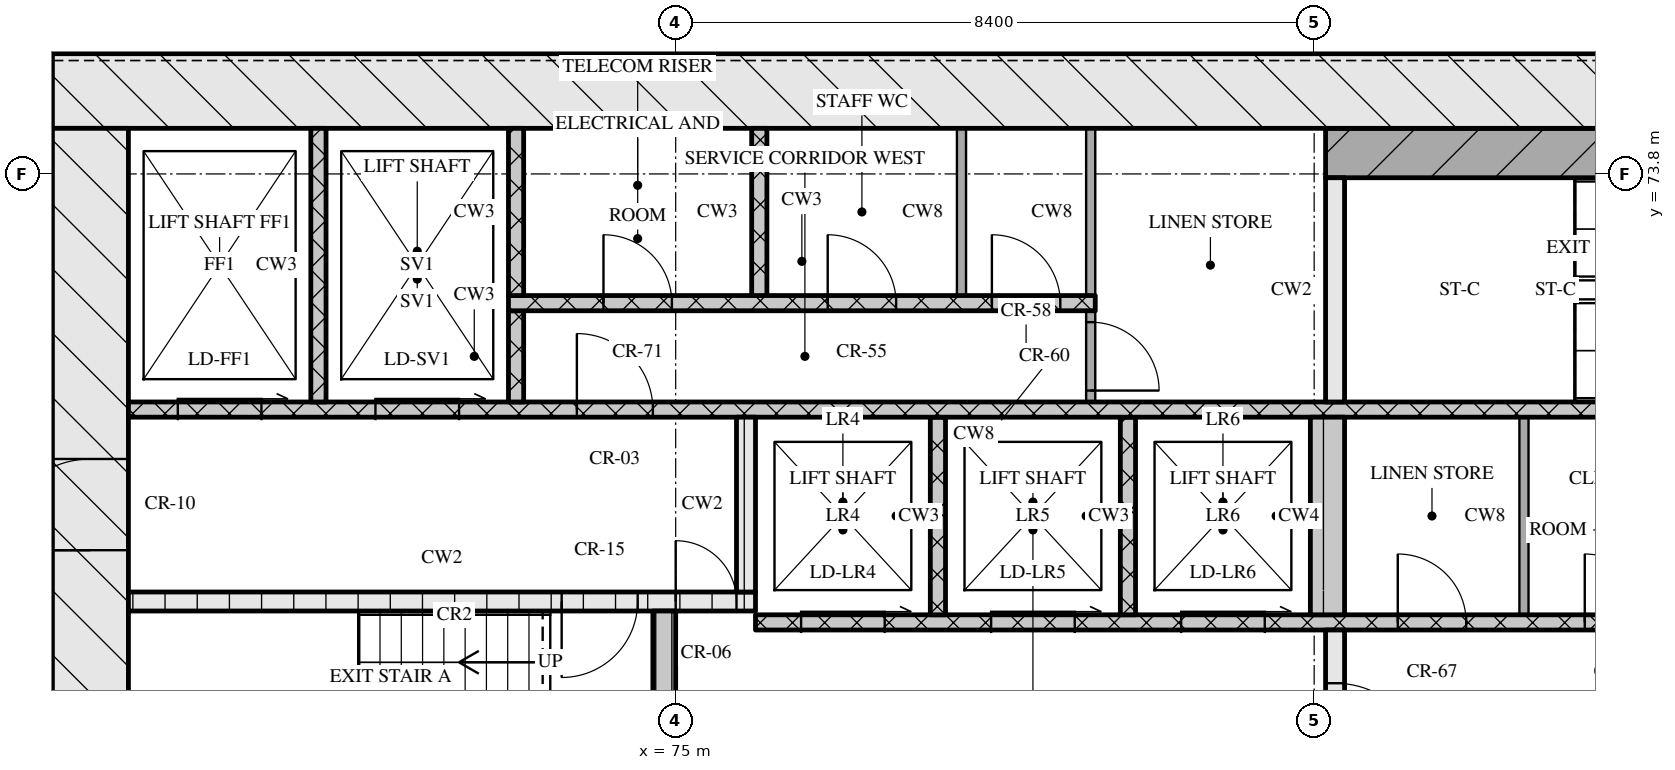
"""IFC4 building model, lengths in metres.
Left out: names, types, materials, properties, quantities, classifications, styles, units other than length and angle.
Written with IfcOpenShell. Run it as: python <this file> out.ifc"""

import sys

from ifc_helpers import new_model, si_unit, direction, frame, frame_2d, origin, place, context, subcontext, project, spatial, rectangle, extrude, element, fill, save


model = new_model("IFC4")
c1 = context("Model", 3, precision=1e-05, world=origin(), true_north=direction((0.0, 1.0)))
c2 = subcontext(c1, "Body", "Model", "MODEL_VIEW")
j1 = project(units=[si_unit("LENGTHUNIT", "METRE"), si_unit("PLANEANGLEUNIT", "RADIAN")], contexts=[c1])
p1 = place(None, origin())
s1 = spatial("IfcSite", under=j1, at=p1, CompositionType="ELEMENT")
p2 = place(p1, origin())
s2 = spatial("IfcBuilding", under=s1, at=p2, CompositionType="ELEMENT")
p3 = place(p2, frame((0.0, 0.0, 116.85)))
s3 = spatial("IfcBuildingStorey", under=s2, at=p3, CompositionType="ELEMENT", Elevation=116.85)
p4 = place(p3, frame((66.8, 74.9, 0.0), z_axis=(0.0, 0.0, 1.0), x_axis=(1.0, 0.0, 0.0)))
e1 = element("IfcWall", 1, at=p4, inside=s3, PredefinedType="SOLIDWALL", context=c2, shape_type="SweptSolid", body=[
    extrude(rectangle(XDim=41.6, YDim=1.0, at=frame_2d((20.8, 0.0))), origin(), (0.0, 0.0, 1.0), 3.32),
])
p5 = place(p3, frame((67.3, 62.4, 0.0), z_axis=(0.0, 0.0, 1.0), x_axis=(0.0, 1.0, 0.0)))
e2 = element("IfcWall", 2, at=p5, inside=s3, PredefinedType="SOLIDWALL", context=c2, shape_type="SweptSolid", body=[
    extrude(rectangle(XDim=12.0, YDim=1.0, at=frame_2d((6.0, 0.0))), origin(), (0.0, 0.0, 1.0), 3.32),
])
p6 = place(p5, frame((6.45, 0.0, 0.0)))
e3 = element("IfcOpeningElement", 3, at=p6, cuts=e2, PredefinedType="OPENING", context=c2, shape_type="SweptSolid", body=[
    extrude(rectangle(XDim=1.2, YDim=2.1, at=frame_2d((0.6, 1.05))), frame((0.0, 0.51, 0.0), z_axis=(0.0, -1.0, 0.0), x_axis=(1.0, 0.0, 0.0)), (0.0, 0.0, 1.0), 1.02),
])
p7 = place(p3, frame((74.85, 65.2, 0.0), z_axis=(0.0, 0.0, 1.0), x_axis=(0.0, 1.0, 0.0)))
e4 = element("IfcWall", 4, at=p7, inside=s3, PredefinedType="SOLIDWALL", context=c2, shape_type="SweptSolid", body=[
    extrude(rectangle(XDim=2.85, YDim=0.3, at=frame_2d((1.425, 0.0))), origin(), (0.0, 0.0, 1.0), 3.32),
])
p8 = place(p3, frame((83.675, 65.2, 0.0), z_axis=(0.0, 0.0, 1.0), x_axis=(0.0, 1.0, 0.0)))
e5 = element("IfcWall", 5, at=p8, inside=s3, PredefinedType="SOLIDWALL", context=c2, shape_type="SweptSolid", body=[
    extrude(rectangle(XDim=2.6, YDim=0.25, at=frame_2d((1.3, 0.0))), origin(), (0.0, 0.0, 1.0), 3.32),
])
p9 = place(p8, frame((0.7, 0.0, 0.0)))
e6 = element("IfcOpeningElement", 6, at=p9, cuts=e5, PredefinedType="OPENING", context=c2, shape_type="SweptSolid", body=[
    extrude(rectangle(XDim=1.2, YDim=2.1, at=frame_2d((0.6, 1.05))), frame((0.0, 0.135, 0.0), z_axis=(0.0, -1.0, 0.0), x_axis=(1.0, 0.0, 0.0)), (0.0, 0.0, 1.0), 0.27),
])
p10 = place(p3, frame((76.05, 67.9, 0.0), z_axis=(0.0, 0.0, 1.0), x_axis=(1.0, 0.0, 0.0)))
e7 = element("IfcWall", 7, at=p10, inside=s3, PredefinedType="SOLIDWALL", context=c2, shape_type="SweptSolid", body=[
    extrude(rectangle(XDim=23.1, YDim=0.2, at=frame_2d((11.55, 0.0))), origin(), (0.0, 0.0, 1.0), 3.32),
])
p11 = place(p10, frame((0.6, 0.0, 0.0)))
e8 = element("IfcOpeningElement", 8, at=p11, cuts=e7, PredefinedType="OPENING", context=c2, shape_type="SweptSolid", body=[
    extrude(rectangle(XDim=1.1, YDim=2.1, at=frame_2d((0.55, 1.05))), frame((0.0, 0.11, 0.0), z_axis=(0.0, -1.0, 0.0), x_axis=(1.0, 0.0, 0.0)), (0.0, 0.0, 1.0), 0.22),
])
p12 = place(p10, frame((3.1, 0.0, 0.0)))
e9 = element("IfcOpeningElement", 9, at=p12, cuts=e7, PredefinedType="OPENING", context=c2, shape_type="SweptSolid", body=[
    extrude(rectangle(XDim=1.1, YDim=2.1, at=frame_2d((0.55, 1.05))), frame((0.0, 0.11, 0.0), z_axis=(0.0, -1.0, 0.0), x_axis=(1.0, 0.0, 0.0)), (0.0, 0.0, 1.0), 0.22),
])
p13 = place(p10, frame((5.6, 0.0, 0.0)))
e10 = element("IfcOpeningElement", 10, at=p13, cuts=e7, PredefinedType="OPENING", context=c2, shape_type="SweptSolid", body=[
    extrude(rectangle(XDim=1.1, YDim=2.1, at=frame_2d((0.55, 1.05))), frame((0.0, 0.11, 0.0), z_axis=(0.0, -1.0, 0.0), x_axis=(1.0, 0.0, 0.0)), (0.0, 0.0, 1.0), 0.22),
])
p14 = place(p10, frame((8.45, 0.0, 0.0)))
e11 = element("IfcOpeningElement", 11, at=p14, cuts=e7, PredefinedType="OPENING", context=c2, shape_type="SweptSolid", body=[
    extrude(rectangle(XDim=0.9, YDim=2.1, at=frame_2d((0.45, 1.05))), frame((0.0, 0.11, 0.0), z_axis=(0.0, -1.0, 0.0), x_axis=(1.0, 0.0, 0.0)), (0.0, 0.0, 1.0), 0.22),
])
p15 = place(p10, frame((10.91, 0.0, 0.0)))
e12 = element("IfcOpeningElement", 12, at=p15, cuts=e7, PredefinedType="OPENING", context=c2, shape_type="SweptSolid", body=[
    extrude(rectangle(XDim=0.9, YDim=2.1, at=frame_2d((0.45, 1.05))), frame((0.0, 0.11, 0.0), z_axis=(0.0, -1.0, 0.0), x_axis=(1.0, 0.0, 0.0)), (0.0, 0.0, 1.0), 0.22),
])
p16 = place(p10, frame((13.55, 0.0, 0.0)))
e13 = element("IfcOpeningElement", 13, at=p16, cuts=e7, PredefinedType="OPENING", context=c2, shape_type="SweptSolid", body=[
    extrude(rectangle(XDim=1.0, YDim=2.1, at=frame_2d((0.5, 1.05))), frame((0.0, 0.11, 0.0), z_axis=(0.0, -1.0, 0.0), x_axis=(1.0, 0.0, 0.0)), (0.0, 0.0, 1.0), 0.22),
])
for number, where, z_axis, x_axis in (
    (14, (78.45, 68.0, 0.0), (0.0, 0.0, 1.0), (0.0, 1.0, 0.0)),
    (15, (80.95, 68.0, 0.0), (0.0, 0.0, 1.0), (0.0, 1.0, 0.0)),
):
    element("IfcWall", number, at=place(p3, frame(where, z_axis=z_axis, x_axis=x_axis)), inside=s3, PredefinedType="SOLIDWALL", context=c2, shape_type="SweptSolid", body=[
        extrude(rectangle(XDim=2.6, YDim=0.2, at=frame_2d((1.3, 0.0))), origin(), (0.0, 0.0, 1.0), 3.32),
    ])
p17 = place(p3, frame((83.575, 68.0, 0.0), z_axis=(0.0, 0.0, 1.0), x_axis=(0.0, 1.0, 0.0)))
e16 = element("IfcWall", 16, at=p17, inside=s3, PredefinedType="SOLIDWALL", context=c2, shape_type="SweptSolid", body=[
    extrude(rectangle(XDim=2.6, YDim=0.45, at=frame_2d((1.3, 0.0))), origin(), (0.0, 0.0, 1.0), 3.32),
])
p18 = place(p3, frame((86.16, 68.0, 0.0), z_axis=(0.0, 0.0, 1.0), x_axis=(0.0, 1.0, 0.0)))
e17 = element("IfcWall", 17, at=p18, inside=s3, PredefinedType="PARTITIONING", context=c2, shape_type="SweptSolid", body=[
    extrude(rectangle(XDim=2.6, YDim=0.12, at=frame_2d((1.3, 0.0))), origin(), (0.0, 0.0, 1.0), 3.32),
])
p19 = place(p3, frame((67.8, 68.175, 0.0), z_axis=(0.0, 0.0, 1.0), x_axis=(1.0, 0.0, 0.0)))
e18 = element("IfcWall", 18, at=p19, inside=s3, PredefinedType="SOLIDWALL", context=c2, shape_type="SweptSolid", body=[
    extrude(rectangle(XDim=8.25, YDim=0.25, at=frame_2d((4.125, 0.0))), origin(), (0.0, 0.0, 1.0), 3.32),
])
p20 = place(p19, frame((5.7, 0.0, 0.0)))
e19 = element("IfcOpeningElement", 19, at=p20, cuts=e18, PredefinedType="OPENING", context=c2, shape_type="SweptSolid", body=[
    extrude(rectangle(XDim=1.0, YDim=2.1, at=frame_2d((0.5, 1.05))), frame((0.0, 0.135, 0.0), z_axis=(0.0, -1.0, 0.0), x_axis=(1.0, 0.0, 0.0)), (0.0, 0.0, 1.0), 0.27),
])
p21 = place(p19, frame((7.2, 0.0, 0.0)))
e20 = element("IfcOpeningElement", 20, at=p21, cuts=e18, PredefinedType="OPENING", context=c2, shape_type="SweptSolid", body=[
    extrude(rectangle(XDim=0.8, YDim=2.1, at=frame_2d((0.4, 1.05))), frame((0.0, 0.135, 0.0), z_axis=(0.0, -1.0, 0.0), x_axis=(1.0, 0.0, 0.0)), (0.0, 0.0, 1.0), 0.27),
])
p22 = place(p3, frame((75.925, 68.3, 0.0), z_axis=(0.0, 0.0, 1.0), x_axis=(0.0, 1.0, 0.0)))
e21 = element("IfcWall", 21, at=p22, inside=s3, PredefinedType="SOLIDWALL", context=c2, shape_type="SweptSolid", body=[
    extrude(rectangle(XDim=2.3, YDim=0.25, at=frame_2d((1.15, 0.0))), origin(), (0.0, 0.0, 1.0), 3.32),
])
p23 = place(p3, frame((67.8, 70.7, 0.0), z_axis=(0.0, 0.0, 1.0), x_axis=(1.0, 0.0, 0.0)))
e22 = element("IfcWall", 22, at=p23, inside=s3, PredefinedType="SOLIDWALL", context=c2, shape_type="SweptSolid", body=[
    extrude(rectangle(XDim=39.6, YDim=0.2, at=frame_2d((19.8, 0.0))), origin(), (0.0, 0.0, 1.0), 3.32),
])
p24 = place(p23, frame((0.65, 0.0, 0.0)))
e23 = element("IfcOpeningElement", 23, at=p24, cuts=e22, PredefinedType="OPENING", context=c2, shape_type="SweptSolid", body=[
    extrude(rectangle(XDim=1.1, YDim=2.1, at=frame_2d((0.55, 1.05))), frame((0.0, 0.11, 0.0), z_axis=(0.0, -1.0, 0.0), x_axis=(1.0, 0.0, 0.0)), (0.0, 0.0, 1.0), 0.22),
])
p25 = place(p23, frame((3.25, 0.0, 0.0)))
e24 = element("IfcOpeningElement", 24, at=p25, cuts=e22, PredefinedType="OPENING", context=c2, shape_type="SweptSolid", body=[
    extrude(rectangle(XDim=1.1, YDim=2.1, at=frame_2d((0.55, 1.05))), frame((0.0, 0.11, 0.0), z_axis=(0.0, -1.0, 0.0), x_axis=(1.0, 0.0, 0.0)), (0.0, 0.0, 1.0), 0.22),
])
p26 = place(p23, frame((5.9, 0.0, 0.0)))
e25 = element("IfcOpeningElement", 25, at=p26, cuts=e22, PredefinedType="OPENING", context=c2, shape_type="SweptSolid", body=[
    extrude(rectangle(XDim=1.0, YDim=2.1, at=frame_2d((0.5, 1.05))), frame((0.0, 0.11, 0.0), z_axis=(0.0, -1.0, 0.0), x_axis=(1.0, 0.0, 0.0)), (0.0, 0.0, 1.0), 0.22),
])
p27 = place(p23, frame((21.7, 0.0, 0.0)))
e26 = element("IfcOpeningElement", 26, at=p27, cuts=e22, PredefinedType="OPENING", context=c2, shape_type="SweptSolid", body=[
    extrude(rectangle(XDim=1.0, YDim=2.1, at=frame_2d((0.5, 1.05))), frame((0.0, 0.11, 0.0), z_axis=(0.0, -1.0, 0.0), x_axis=(1.0, 0.0, 0.0)), (0.0, 0.0, 1.0), 0.22),
])
p28 = place(p23, frame((32.7, 0.0, 0.0)))
e27 = element("IfcOpeningElement", 27, at=p28, cuts=e22, PredefinedType="OPENING", context=c2, shape_type="SweptSolid", body=[
    extrude(rectangle(XDim=1.0, YDim=2.1, at=frame_2d((0.5, 1.05))), frame((0.0, 0.11, 0.0), z_axis=(0.0, -1.0, 0.0), x_axis=(1.0, 0.0, 0.0)), (0.0, 0.0, 1.0), 0.22),
])
p29 = place(p23, frame((35.25, 0.0, 0.0)))
e28 = element("IfcOpeningElement", 28, at=p29, cuts=e22, PredefinedType="OPENING", context=c2, shape_type="SweptSolid", body=[
    extrude(rectangle(XDim=1.1, YDim=2.1, at=frame_2d((0.55, 1.05))), frame((0.0, 0.11, 0.0), z_axis=(0.0, -1.0, 0.0), x_axis=(1.0, 0.0, 0.0)), (0.0, 0.0, 1.0), 0.22),
])
p30 = place(p23, frame((37.85, 0.0, 0.0)))
e29 = element("IfcOpeningElement", 29, at=p30, cuts=e22, PredefinedType="OPENING", context=c2, shape_type="SweptSolid", body=[
    extrude(rectangle(XDim=1.1, YDim=2.1, at=frame_2d((0.55, 1.05))), frame((0.0, 0.11, 0.0), z_axis=(0.0, -1.0, 0.0), x_axis=(1.0, 0.0, 0.0)), (0.0, 0.0, 1.0), 0.22),
])
p31 = place(p3, frame((70.3, 70.8, 0.0), z_axis=(0.0, 0.0, 1.0), x_axis=(0.0, 1.0, 0.0)))
e30 = element("IfcWall", 30, at=p31, inside=s3, PredefinedType="SOLIDWALL", context=c2, shape_type="SweptSolid", body=[
    extrude(rectangle(XDim=3.6, YDim=0.2, at=frame_2d((1.8, 0.0))), origin(), (0.0, 0.0, 1.0), 3.32),
])
p32 = place(p3, frame((72.9, 70.8, 0.0), z_axis=(0.0, 0.0, 1.0), x_axis=(0.0, 1.0, 0.0)))
e31 = element("IfcWall", 31, at=p32, inside=s3, PredefinedType="SOLIDWALL", context=c2, shape_type="SweptSolid", body=[
    extrude(rectangle(XDim=1.2, YDim=0.2, at=frame_2d((0.6, 0.0))), origin(), (0.0, 0.0, 1.0), 3.32),
])
p33 = place(p3, frame((80.46, 70.8, 0.0), z_axis=(0.0, 0.0, 1.0), x_axis=(0.0, 1.0, 0.0)))
e32 = element("IfcWall", 32, at=p33, inside=s3, PredefinedType="PARTITIONING", context=c2, shape_type="SweptSolid", body=[
    extrude(rectangle(XDim=1.2, YDim=0.12, at=frame_2d((0.6, 0.0))), origin(), (0.0, 0.0, 1.0), 3.32),
])
p34 = place(p33, frame((0.15, 0.0, 0.0)))
e33 = element("IfcOpeningElement", 33, at=p34, cuts=e32, PredefinedType="OPENING", context=c2, shape_type="SweptSolid", body=[
    extrude(rectangle(XDim=0.9, YDim=2.1, at=frame_2d((0.45, 1.05))), frame((0.0, 0.07, 0.0), z_axis=(0.0, -1.0, 0.0), x_axis=(1.0, 0.0, 0.0)), (0.0, 0.0, 1.0), 0.14),
])
p35 = place(p3, frame((83.675, 70.8, 0.0), z_axis=(0.0, 0.0, 1.0), x_axis=(0.0, 1.0, 0.0)))
e34 = element("IfcWall", 34, at=p35, inside=s3, PredefinedType="SOLIDWALL", context=c2, shape_type="SweptSolid", body=[
    extrude(rectangle(XDim=2.95, YDim=0.25, at=frame_2d((1.475, 0.0))), origin(), (0.0, 0.0, 1.0), 3.32),
])
p36 = place(p3, frame((72.8, 72.1, 0.0), z_axis=(0.0, 0.0, 1.0), x_axis=(1.0, 0.0, 0.0)))
e35 = element("IfcWall", 35, at=p36, inside=s3, PredefinedType="SOLIDWALL", context=c2, shape_type="SweptSolid", body=[
    extrude(rectangle(XDim=7.72, YDim=0.2, at=frame_2d((3.86, 0.0))), origin(), (0.0, 0.0, 1.0), 3.32),
])
p37 = place(p36, frame((1.25, 0.0, 0.0)))
e36 = element("IfcOpeningElement", 36, at=p37, cuts=e35, PredefinedType="OPENING", context=c2, shape_type="SweptSolid", body=[
    extrude(rectangle(XDim=0.9, YDim=2.1, at=frame_2d((0.45, 1.05))), frame((0.0, 0.11, 0.0), z_axis=(0.0, -1.0, 0.0), x_axis=(1.0, 0.0, 0.0)), (0.0, 0.0, 1.0), 0.22),
])
p38 = place(p36, frame((4.2, 0.0, 0.0)))
e37 = element("IfcOpeningElement", 37, at=p38, cuts=e35, PredefinedType="OPENING", context=c2, shape_type="SweptSolid", body=[
    extrude(rectangle(XDim=0.9, YDim=2.1, at=frame_2d((0.45, 1.05))), frame((0.0, 0.11, 0.0), z_axis=(0.0, -1.0, 0.0), x_axis=(1.0, 0.0, 0.0)), (0.0, 0.0, 1.0), 0.22),
])
p39 = place(p36, frame((6.36, 0.0, 0.0)))
e38 = element("IfcOpeningElement", 38, at=p39, cuts=e35, PredefinedType="OPENING", context=c2, shape_type="SweptSolid", body=[
    extrude(rectangle(XDim=0.9, YDim=2.1, at=frame_2d((0.45, 1.05))), frame((0.0, 0.11, 0.0), z_axis=(0.0, -1.0, 0.0), x_axis=(1.0, 0.0, 0.0)), (0.0, 0.0, 1.0), 0.22),
])
for number, where, z_axis, x_axis in (
    (39, (72.9, 72.2, 0.0), (0.0, 0.0, 1.0), (0.0, 1.0, 0.0)),
    (40, (76.1, 72.2, 0.0), (0.0, 0.0, 1.0), (0.0, 1.0, 0.0)),
):
    element("IfcWall", number, at=place(p3, frame(where, z_axis=z_axis, x_axis=x_axis)), inside=s3, PredefinedType="SOLIDWALL", context=c2, shape_type="SweptSolid", body=[
        extrude(rectangle(XDim=2.2, YDim=0.2, at=frame_2d((1.1, 0.0))), origin(), (0.0, 0.0, 1.0), 3.32),
    ])
for number, where, z_axis, x_axis in (
    (41, (78.76, 72.2, 0.0), (0.0, 0.0, 1.0), (0.0, 1.0, 0.0)),
    (42, (80.46, 72.2, 0.0), (0.0, 0.0, 1.0), (0.0, 1.0, 0.0)),
):
    element("IfcWall", number, at=place(p3, frame(where, z_axis=z_axis, x_axis=x_axis)), inside=s3, PredefinedType="PARTITIONING", context=c2, shape_type="SweptSolid", body=[
        extrude(rectangle(XDim=2.2, YDim=0.12, at=frame_2d((1.1, 0.0))), origin(), (0.0, 0.0, 1.0), 3.32),
    ])
p40 = place(p3, frame((83.55, 74.075, 0.0), z_axis=(0.0, 0.0, 1.0), x_axis=(1.0, 0.0, 0.0)))
e43 = element("IfcWall", 43, at=p40, inside=s3, PredefinedType="SOLIDWALL", context=c2, shape_type="SweptSolid", body=[
    extrude(rectangle(XDim=8.1, YDim=0.65, at=frame_2d((4.05, 0.0))), origin(), (0.0, 0.0, 1.0), 3.32),
])
p41 = place(p9, origin())
e44 = element("IfcDoor", 44, at=p41, inside=s3, OperationType="SINGLE_SWING_RIGHT", PredefinedType="DOOR", context=c2, shape_type="SweptSolid", body=[
    extrude(rectangle(XDim=1.2, YDim=2.1, at=frame_2d((0.6, 1.05))), frame((0.0, 0.025, 0.0), z_axis=(0.0, -1.0, 0.0), x_axis=(1.0, 0.0, 0.0)), (0.0, 0.0, 1.0), 0.05),
])
fill(e6, e44)
p42 = place(p11, origin())
e45 = element("IfcDoor", 45, at=p42, inside=s3, OperationType="SLIDING_TO_RIGHT", PredefinedType="DOOR", context=c2, shape_type="SweptSolid", body=[
    extrude(rectangle(XDim=1.1, YDim=2.1, at=frame_2d((0.55, 1.05))), frame((0.0, 0.025, 0.0), z_axis=(0.0, -1.0, 0.0), x_axis=(1.0, 0.0, 0.0)), (0.0, 0.0, 1.0), 0.05),
])
fill(e8, e45)
p43 = place(p12, origin())
e46 = element("IfcDoor", 46, at=p43, inside=s3, OperationType="SLIDING_TO_RIGHT", PredefinedType="DOOR", context=c2, shape_type="SweptSolid", body=[
    extrude(rectangle(XDim=1.1, YDim=2.1, at=frame_2d((0.55, 1.05))), frame((0.0, 0.025, 0.0), z_axis=(0.0, -1.0, 0.0), x_axis=(1.0, 0.0, 0.0)), (0.0, 0.0, 1.0), 0.05),
])
fill(e9, e46)
p44 = place(p13, origin())
e47 = element("IfcDoor", 47, at=p44, inside=s3, OperationType="SLIDING_TO_RIGHT", PredefinedType="DOOR", context=c2, shape_type="SweptSolid", body=[
    extrude(rectangle(XDim=1.1, YDim=2.1, at=frame_2d((0.55, 1.05))), frame((0.0, 0.025, 0.0), z_axis=(0.0, -1.0, 0.0), x_axis=(1.0, 0.0, 0.0)), (0.0, 0.0, 1.0), 0.05),
])
fill(e10, e47)
p45 = place(p14, origin())
e48 = element("IfcDoor", 48, at=p45, inside=s3, OperationType="SINGLE_SWING_LEFT", PredefinedType="DOOR", context=c2, shape_type="SweptSolid", body=[
    extrude(rectangle(XDim=0.9, YDim=2.1, at=frame_2d((0.45, 1.05))), frame((0.0, 0.025, 0.0), z_axis=(0.0, -1.0, 0.0), x_axis=(1.0, 0.0, 0.0)), (0.0, 0.0, 1.0), 0.05),
])
fill(e11, e48)
p46 = place(p15, origin())
e49 = element("IfcDoor", 49, at=p46, inside=s3, OperationType="SINGLE_SWING_LEFT", PredefinedType="DOOR", context=c2, shape_type="SweptSolid", body=[
    extrude(rectangle(XDim=0.9, YDim=2.1, at=frame_2d((0.45, 1.05))), frame((0.0, 0.025, 0.0), z_axis=(0.0, -1.0, 0.0), x_axis=(1.0, 0.0, 0.0)), (0.0, 0.0, 1.0), 0.05),
])
fill(e12, e49)
p47 = place(p20, origin())
e50 = element("IfcDoor", 50, at=p47, inside=s3, OperationType="SINGLE_SWING_RIGHT", PredefinedType="DOOR", context=c2, shape_type="SweptSolid", body=[
    extrude(rectangle(XDim=1.0, YDim=2.1, at=frame_2d((0.5, 1.05))), frame((0.0, 0.025, 0.0), z_axis=(0.0, -1.0, 0.0), x_axis=(1.0, 0.0, 0.0)), (0.0, 0.0, 1.0), 0.05),
])
fill(e19, e50)
p48 = place(p21, origin())
e51 = element("IfcDoor", 51, at=p48, inside=s3, OperationType="SINGLE_SWING_LEFT", PredefinedType="DOOR", context=c2, shape_type="SweptSolid", body=[
    extrude(rectangle(XDim=0.8, YDim=2.1, at=frame_2d((0.4, 1.05))), frame((0.0, 0.025, 0.0), z_axis=(0.0, -1.0, 0.0), x_axis=(1.0, 0.0, 0.0)), (0.0, 0.0, 1.0), 0.05),
])
fill(e20, e51)
p49 = place(p6, origin())
e52 = element("IfcDoor", 52, at=p49, inside=s3, OperationType="SINGLE_SWING_LEFT", PredefinedType="DOOR", context=c2, shape_type="SweptSolid", body=[
    extrude(rectangle(XDim=1.2, YDim=2.1, at=frame_2d((0.6, 1.05))), frame((0.0, 0.025, 0.0), z_axis=(0.0, -1.0, 0.0), x_axis=(1.0, 0.0, 0.0)), (0.0, 0.0, 1.0), 0.05),
])
fill(e3, e52)
p50 = place(p24, origin())
e53 = element("IfcDoor", 53, at=p50, inside=s3, OperationType="SLIDING_TO_RIGHT", PredefinedType="DOOR", context=c2, shape_type="SweptSolid", body=[
    extrude(rectangle(XDim=1.1, YDim=2.1, at=frame_2d((0.55, 1.05))), frame((0.0, 0.025, 0.0), z_axis=(0.0, -1.0, 0.0), x_axis=(1.0, 0.0, 0.0)), (0.0, 0.0, 1.0), 0.05),
])
fill(e23, e53)
p51 = place(p25, origin())
e54 = element("IfcDoor", 54, at=p51, inside=s3, OperationType="SLIDING_TO_RIGHT", PredefinedType="DOOR", context=c2, shape_type="SweptSolid", body=[
    extrude(rectangle(XDim=1.1, YDim=2.1, at=frame_2d((0.55, 1.05))), frame((0.0, 0.025, 0.0), z_axis=(0.0, -1.0, 0.0), x_axis=(1.0, 0.0, 0.0)), (0.0, 0.0, 1.0), 0.05),
])
fill(e24, e54)
p52 = place(p26, origin())
e55 = element("IfcDoor", 55, at=p52, inside=s3, OperationType="SINGLE_SWING_LEFT", PredefinedType="DOOR", context=c2, shape_type="SweptSolid", body=[
    extrude(rectangle(XDim=1.0, YDim=2.1, at=frame_2d((0.5, 1.05))), frame((0.0, 0.025, 0.0), z_axis=(0.0, -1.0, 0.0), x_axis=(1.0, 0.0, 0.0)), (0.0, 0.0, 1.0), 0.05),
])
fill(e25, e55)
p53 = place(p34, origin())
e56 = element("IfcDoor", 56, at=p53, inside=s3, OperationType="SINGLE_SWING_RIGHT", PredefinedType="DOOR", context=c2, shape_type="SweptSolid", body=[
    extrude(rectangle(XDim=0.9, YDim=2.1, at=frame_2d((0.45, 1.05))), frame((0.0, 0.025, 0.0), z_axis=(0.0, -1.0, 0.0), x_axis=(1.0, 0.0, 0.0)), (0.0, 0.0, 1.0), 0.05),
])
fill(e33, e56)
p54 = place(p37, origin())
e57 = element("IfcDoor", 57, at=p54, inside=s3, OperationType="SINGLE_SWING_LEFT", PredefinedType="DOOR", context=c2, shape_type="SweptSolid", body=[
    extrude(rectangle(XDim=0.9, YDim=2.1, at=frame_2d((0.45, 1.05))), frame((0.0, 0.025, 0.0), z_axis=(0.0, -1.0, 0.0), x_axis=(1.0, 0.0, 0.0)), (0.0, 0.0, 1.0), 0.05),
])
fill(e36, e57)
p55 = place(p38, origin())
e58 = element("IfcDoor", 58, at=p55, inside=s3, OperationType="SINGLE_SWING_LEFT", PredefinedType="DOOR", context=c2, shape_type="SweptSolid", body=[
    extrude(rectangle(XDim=0.9, YDim=2.1, at=frame_2d((0.45, 1.05))), frame((0.0, 0.025, 0.0), z_axis=(0.0, -1.0, 0.0), x_axis=(1.0, 0.0, 0.0)), (0.0, 0.0, 1.0), 0.05),
])
fill(e37, e58)
p56 = place(p39, origin())
e59 = element("IfcDoor", 59, at=p56, inside=s3, OperationType="SINGLE_SWING_LEFT", PredefinedType="DOOR", context=c2, shape_type="SweptSolid", body=[
    extrude(rectangle(XDim=0.9, YDim=2.1, at=frame_2d((0.45, 1.05))), frame((0.0, 0.025, 0.0), z_axis=(0.0, -1.0, 0.0), x_axis=(1.0, 0.0, 0.0)), (0.0, 0.0, 1.0), 0.05),
])
fill(e38, e59)
save(model, sys.argv[1])
